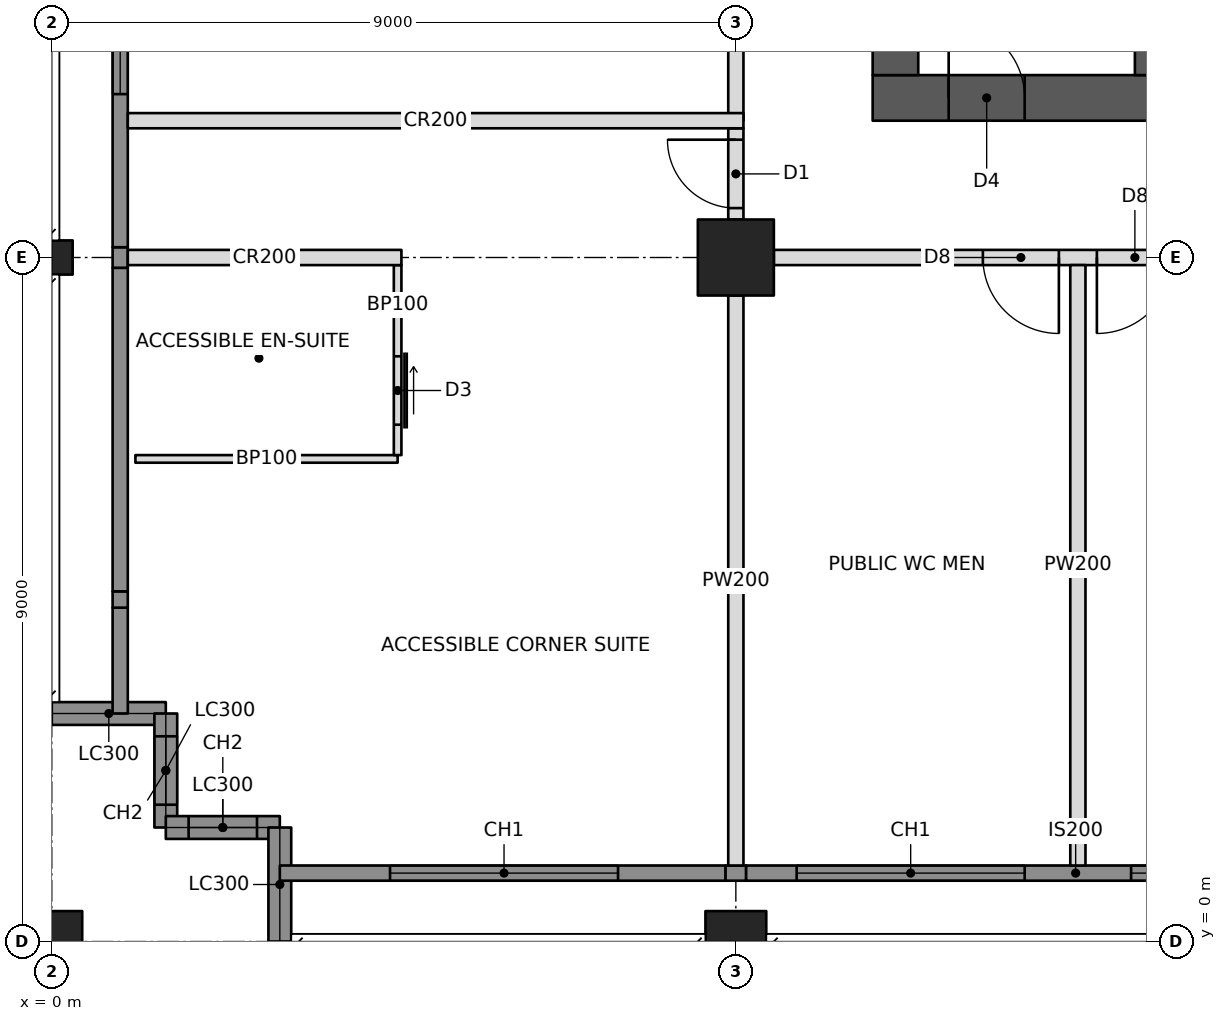
"""IFC4 building model, lengths in metres.
Left out: names, types, materials, properties, quantities, classifications, styles, units other than length and angle.
Written with IfcOpenShell. Run it as: python <this file> out.ifc"""

import sys

from ifc_helpers import new_model, si_unit, direction, frame, frame_2d, origin, origin_with_axes, origin_2d, place, context, subcontext, project, spatial, rectangle, hollow_rectangle, i_section, extrude, element, fill, save


model = new_model("IFC4")
c1 = context("Model", 3, precision=1e-05, world=origin(), true_north=direction((0.0, 1.0)))
c2 = subcontext(c1, "Body", "Model", "MODEL_VIEW")
j1 = project(units=[si_unit("LENGTHUNIT", "METRE"), si_unit("PLANEANGLEUNIT", "RADIAN")], contexts=[c1])
p1 = place(None, origin())
s1 = spatial("IfcSite", under=j1, at=p1, CompositionType="ELEMENT")
p2 = place(p1, origin())
s2 = spatial("IfcBuilding", under=s1, at=p2, CompositionType="ELEMENT")
p3 = place(p2, frame((0.0, 0.0, 160.4)))
s3 = spatial("IfcBuildingStorey", under=s2, at=p3, CompositionType="ELEMENT", Elevation=160.4)
p4 = place(p3, origin_with_axes())
e1 = element("IfcColumn", 1, at=p4, inside=s3, PredefinedType="COLUMN", context=c2, shape_type="SweptSolid", body=[
    extrude(hollow_rectangle(XDim=0.8, YDim=0.8, WallThickness=0.07, at=origin_2d()), origin(), (0.0, 0.0, 1.0), 3.4),
])
p5 = place(p3, frame((0.0, 9.0, 0.0), z_axis=(0.0, 0.0, 1.0), x_axis=(0.0, 1.0, 0.0)))
e2 = element("IfcColumn", 2, at=p5, inside=s3, PredefinedType="COLUMN", context=c2, shape_type="SweptSolid", body=[
    extrude(i_section(OverallWidth=0.449, OverallDepth=0.549, WebThickness=0.072, FlangeThickness=0.115, at=origin_2d()), origin(), (0.0, 0.0, 1.0), 3.4),
])
p6 = place(p3, frame((9.0, 0.0, 0.0), z_axis=(0.0, 0.0, 1.0), x_axis=(1.0, 0.0, 0.0)))
e3 = element("IfcColumn", 3, at=p6, inside=s3, PredefinedType="COLUMN", context=c2, shape_type="SweptSolid", body=[
    extrude(hollow_rectangle(XDim=0.8, YDim=0.8, WallThickness=0.07, at=origin_2d()), origin(), (0.0, 0.0, 1.0), 3.4),
])
p7 = place(p3, frame((9.0, 9.0, 0.0), z_axis=(0.0, 0.0, 1.0), x_axis=(1.0, 0.0, 0.0)))
e4 = element("IfcColumn", 4, at=p7, inside=s3, PredefinedType="COLUMN", context=c2, shape_type="SweptSolid", body=[
    extrude(hollow_rectangle(XDim=1.0, YDim=1.0, WallThickness=0.1, at=origin_2d()), origin(), (0.0, 0.0, 1.0), 3.4),
])
p8 = place(p3, frame((10.8, 11.1, 0.0), z_axis=(0.0, 0.0, 1.0), x_axis=(1.0, 0.0, 0.0)))
e5 = element("IfcWall", 5, at=p8, inside=s3, PredefinedType="SHEAR", context=c2, shape_type="SweptSolid", body=[
    extrude(rectangle(XDim=23.4, YDim=0.6, at=frame_2d((11.7, 0.0))), origin(), (0.0, 0.0, 1.0), 3.4),
])
p9 = place(p8, frame((1.0, 0.0, 0.0)))
e6 = element("IfcOpeningElement", 6, at=p9, cuts=e5, PredefinedType="OPENING", context=c2, shape_type="SweptSolid", body=[
    extrude(rectangle(XDim=1.0, YDim=2.1, at=frame_2d((0.5, 1.05))), frame((0.0, 0.31, 0.0), z_axis=(0.0, -1.0, 0.0), x_axis=(1.0, 0.0, 0.0)), (0.0, 0.0, 1.0), 0.62),
])
p10 = place(p8, frame((17.2, 0.0, 0.0)))
e7 = element("IfcOpeningElement", 7, at=p10, cuts=e5, PredefinedType="OPENING", context=c2, shape_type="SweptSolid", body=[
    extrude(rectangle(XDim=1.8, YDim=2.1, at=frame_2d((0.9, 1.05))), frame((0.0, 0.31, 0.0), z_axis=(0.0, -1.0, 0.0), x_axis=(1.0, 0.0, 0.0)), (0.0, 0.0, 1.0), 0.62),
])
p11 = place(p3, frame((11.1, 11.4, 0.0), z_axis=(0.0, 0.0, 1.0), x_axis=(0.0, 1.0, 0.0)))
e8 = element("IfcWall", 8, at=p11, inside=s3, PredefinedType="SHEAR", context=c2, shape_type="SweptSolid", body=[
    extrude(rectangle(XDim=13.2, YDim=0.6, at=frame_2d((6.6, 0.0))), origin(), (0.0, 0.0, 1.0), 3.4),
])
p12 = place(p3, frame((14.4, 11.4, 0.0), z_axis=(0.0, 0.0, 1.0), x_axis=(0.0, 1.0, 0.0)))
e9 = element("IfcWall", 9, at=p12, inside=s3, PredefinedType="SHEAR", context=c2, shape_type="SweptSolid", body=[
    extrude(rectangle(XDim=13.2, YDim=0.3, at=frame_2d((6.6, 0.0))), origin(), (0.0, 0.0, 1.0), 3.4),
])
p13 = place(p3, frame((0.0, 3.0, 0.0), z_axis=(0.0, 0.0, 1.0), x_axis=(1.0, 0.0, 0.0)))
e10 = element("IfcWall", 10, at=p13, inside=s3, PredefinedType="SOLIDWALL", context=c2, shape_type="SweptSolid", body=[
    extrude(rectangle(XDim=1.5, YDim=0.3, at=frame_2d((0.75, 0.0))), origin(), (0.0, 0.0, 1.0), 2.42),
])
p14 = place(p3, frame((1.5, 3.0, 0.0), z_axis=(0.0, 0.0, 1.0), x_axis=(0.0, -1.0, 0.0)))
e11 = element("IfcWall", 11, at=p14, inside=s3, PredefinedType="SOLIDWALL", context=c2, shape_type="SweptSolid", body=[
    extrude(rectangle(XDim=1.5, YDim=0.3, at=frame_2d((0.75, 0.0))), origin(), (0.0, 0.0, 1.0), 3.2),
])
p15 = place(p14, frame((0.3, 0.0, 0.6)))
e12 = element("IfcOpeningElement", 12, at=p15, cuts=e11, PredefinedType="OPENING", context=c2, shape_type="SweptSolid", body=[
    extrude(rectangle(XDim=0.9, YDim=2.2, at=frame_2d((0.45, 1.1))), frame((0.0, 0.16, 0.0), z_axis=(0.0, -1.0, 0.0), x_axis=(1.0, 0.0, 0.0)), (0.0, 0.0, 1.0), 0.32),
])
p16 = place(p3, frame((1.5, 1.5, 0.0), z_axis=(0.0, 0.0, 1.0), x_axis=(1.0, 0.0, 0.0)))
e13 = element("IfcWall", 13, at=p16, inside=s3, PredefinedType="SOLIDWALL", context=c2, shape_type="SweptSolid", body=[
    extrude(rectangle(XDim=1.5, YDim=0.3, at=frame_2d((0.75, 0.0))), origin(), (0.0, 0.0, 1.0), 3.2),
])
p17 = place(p16, frame((0.3, 0.0, 0.6)))
e14 = element("IfcOpeningElement", 14, at=p17, cuts=e13, PredefinedType="OPENING", context=c2, shape_type="SweptSolid", body=[
    extrude(rectangle(XDim=0.9, YDim=2.2, at=frame_2d((0.45, 1.1))), frame((0.0, 0.16, 0.0), z_axis=(0.0, -1.0, 0.0), x_axis=(1.0, 0.0, 0.0)), (0.0, 0.0, 1.0), 0.32),
])
p18 = place(p3, frame((3.0, 1.5, 0.0), z_axis=(0.0, 0.0, 1.0), x_axis=(0.0, -1.0, 0.0)))
e15 = element("IfcWall", 15, at=p18, inside=s3, PredefinedType="SOLIDWALL", context=c2, shape_type="SweptSolid", body=[
    extrude(rectangle(XDim=1.5, YDim=0.3, at=frame_2d((0.75, 0.0))), origin(), (0.0, 0.0, 1.0), 2.42),
])
p19 = place(p3, frame((3.0, 0.9, 0.0), z_axis=(0.0, 0.0, 1.0), x_axis=(1.0, 0.0, 0.0)))
e16 = element("IfcWall", 16, at=p19, inside=s3, PredefinedType="SOLIDWALL", context=c2, shape_type="SweptSolid", body=[
    extrude(rectangle(XDim=5.865, YDim=0.2, at=frame_2d((2.932, 0.0))), origin(), (0.0, 0.0, 1.0), 3.2),
])
p20 = place(p19, frame((1.45, 0.0, 0.6)))
e17 = element("IfcOpeningElement", 17, at=p20, cuts=e16, PredefinedType="OPENING", context=c2, shape_type="SweptSolid", body=[
    extrude(rectangle(XDim=3.0, YDim=2.2, at=frame_2d((1.5, 1.1))), frame((0.0, 0.11, 0.0), z_axis=(0.0, -1.0, 0.0), x_axis=(1.0, 0.0, 0.0)), (0.0, 0.0, 1.0), 0.22),
])
p21 = place(p3, frame((0.9, 3.0, 0.0), z_axis=(0.0, 0.0, 1.0), x_axis=(0.0, 1.0, 0.0)))
e18 = element("IfcWall", 18, at=p21, inside=s3, PredefinedType="SOLIDWALL", context=c2, shape_type="SweptSolid", body=[
    extrude(rectangle(XDim=1.393, YDim=0.2, at=frame_2d((0.696, 0.0))), origin(), (0.0, 0.0, 1.0), 3.2),
])
p22 = place(p3, frame((1.0, 9.0, 0.0), z_axis=(0.0, 0.0, 1.0), x_axis=(1.0, 0.0, 0.0)))
e19 = element("IfcWall", 19, at=p22, inside=s3, PredefinedType="PARTITIONING", context=c2, shape_type="SweptSolid", body=[
    extrude(rectangle(XDim=3.6, YDim=0.2, at=frame_2d((1.8, 0.0))), origin(), (0.0, 0.0, 1.0), 2.438),
])
p23 = place(p3, frame((9.5, 9.0, 0.0), z_axis=(0.0, 0.0, 1.0), x_axis=(1.0, 0.0, 0.0)))
e20 = element("IfcWall", 20, at=p23, inside=s3, PredefinedType="PARTITIONING", context=c2, shape_type="SweptSolid", body=[
    extrude(rectangle(XDim=8.0, YDim=0.2, at=frame_2d((4.0, 0.0))), origin(), (0.0, 0.0, 1.0), 2.405),
])
p24 = place(p23, frame((2.75, 0.0, 0.0)))
e21 = element("IfcOpeningElement", 21, at=p24, cuts=e20, PredefinedType="OPENING", context=c2, shape_type="SweptSolid", body=[
    extrude(rectangle(XDim=1.0, YDim=2.1, at=frame_2d((0.5, 1.05))), frame((0.0, 0.11, 0.0), z_axis=(0.0, -1.0, 0.0), x_axis=(1.0, 0.0, 0.0)), (0.0, 0.0, 1.0), 0.22),
])
p25 = place(p23, frame((6.8, 0.0, 0.0)))
e22 = element("IfcOpeningElement", 22, at=p25, cuts=e20, PredefinedType="OPENING", context=c2, shape_type="SweptSolid", body=[
    extrude(rectangle(XDim=1.0, YDim=2.1, at=frame_2d((0.5, 1.05))), frame((0.0, 0.11, 0.0), z_axis=(0.0, -1.0, 0.0), x_axis=(1.0, 0.0, 0.0)), (0.0, 0.0, 1.0), 0.22),
])
p26 = place(p23, frame((4.25, 0.0, 0.0)))
e23 = element("IfcOpeningElement", 23, at=p26, cuts=e20, PredefinedType="OPENING", context=c2, shape_type="SweptSolid", body=[
    extrude(rectangle(XDim=1.0, YDim=2.1, at=frame_2d((0.5, 1.05))), frame((0.0, 0.11, 0.0), z_axis=(0.0, -1.0, 0.0), x_axis=(1.0, 0.0, 0.0)), (0.0, 0.0, 1.0), 0.22),
])
p27 = place(p3, frame((9.0, 10.8, 0.0), z_axis=(0.0, 0.0, 1.0), x_axis=(0.0, 1.0, 0.0)))
e24 = element("IfcWall", 24, at=p27, inside=s3, PredefinedType="PARTITIONING", context=c2, shape_type="SweptSolid", body=[
    extrude(rectangle(XDim=6.7, YDim=0.2, at=frame_2d((3.35, 0.0))), origin(), (0.0, 0.0, 1.0), 2.405),
])
p28 = place(p27, frame((3.6, 0.0, 0.0)))
e25 = element("IfcOpeningElement", 25, at=p28, cuts=e24, PredefinedType="OPENING", context=c2, shape_type="SweptSolid", body=[
    extrude(rectangle(XDim=1.8, YDim=2.4, at=frame_2d((0.9, 1.2))), frame((0.0, 0.11, 0.0), z_axis=(0.0, -1.0, 0.0), x_axis=(1.0, 0.0, 0.0)), (0.0, 0.0, 1.0), 0.22),
])
p29 = place(p3, frame((1.0, 10.8, 0.0), z_axis=(0.0, 0.0, 1.0), x_axis=(1.0, 0.0, 0.0)))
e26 = element("IfcWall", 26, at=p29, inside=s3, PredefinedType="PARTITIONING", context=c2, shape_type="SweptSolid", body=[
    extrude(rectangle(XDim=8.1, YDim=0.2, at=frame_2d((4.05, 0.0))), origin(), (0.0, 0.0, 1.0), 2.404),
])
p30 = place(p3, frame((9.0, 8.5, 0.0), z_axis=(0.0, 0.0, 1.0), x_axis=(0.0, -1.0, 0.0)))
e27 = element("IfcWall", 27, at=p30, inside=s3, PredefinedType="PARTITIONING", context=c2, shape_type="SweptSolid", body=[
    extrude(rectangle(XDim=7.5, YDim=0.2, at=frame_2d((3.75, 0.0))), origin(), (0.0, 0.0, 1.0), 2.438),
])
p31 = place(p3, frame((1.1, 6.35, 0.0), z_axis=(0.0, 0.0, 1.0), x_axis=(1.0, 0.0, 0.0)))
e28 = element("IfcWall", 28, at=p31, inside=s3, PredefinedType="PARTITIONING", context=c2, shape_type="SweptSolid", body=[
    extrude(rectangle(XDim=3.45, YDim=0.1, at=frame_2d((1.725, 0.0))), origin(), (0.0, 0.0, 1.0), 3.2),
])
p32 = place(p3, frame((4.55, 8.9, 0.0), z_axis=(0.0, 0.0, 1.0), x_axis=(0.0, -1.0, 0.0)))
e29 = element("IfcWall", 29, at=p32, inside=s3, PredefinedType="PARTITIONING", context=c2, shape_type="SweptSolid", body=[
    extrude(rectangle(XDim=2.5, YDim=0.1, at=frame_2d((1.25, 0.0))), origin(), (0.0, 0.0, 1.0), 2.438),
])
p33 = place(p32, frame((1.2, 0.0, 0.0)))
e30 = element("IfcOpeningElement", 30, at=p33, cuts=e29, PredefinedType="OPENING", context=c2, shape_type="SweptSolid", body=[
    extrude(rectangle(XDim=0.9, YDim=2.1, at=frame_2d((0.45, 1.05))), frame((0.0, 0.06, 0.0), z_axis=(0.0, -1.0, 0.0), x_axis=(1.0, 0.0, 0.0)), (0.0, 0.0, 1.0), 0.12),
])
p34 = place(p3, frame((13.5, 8.9, 0.0), z_axis=(0.0, 0.0, 1.0), x_axis=(0.0, -1.0, 0.0)))
e31 = element("IfcWall", 31, at=p34, inside=s3, PredefinedType="PARTITIONING", context=c2, shape_type="SweptSolid", body=[
    extrude(rectangle(XDim=7.9, YDim=0.2, at=frame_2d((3.95, 0.0))), origin(), (0.0, 0.0, 1.0), 2.404),
])
p35 = place(p3, frame((9.0, 9.5, 0.0), z_axis=(0.0, 0.0, 1.0), x_axis=(0.0, 1.0, 0.0)))
e32 = element("IfcWall", 32, at=p35, inside=s3, PredefinedType="PARTITIONING", context=c2, shape_type="SweptSolid", body=[
    extrude(rectangle(XDim=1.2, YDim=0.2, at=frame_2d((0.6, 0.0))), origin(), (0.0, 0.0, 1.0), 2.405),
])
p36 = place(p35, frame((0.15, 0.0, 0.0)))
e33 = element("IfcOpeningElement", 33, at=p36, cuts=e32, PredefinedType="OPENING", context=c2, shape_type="SweptSolid", body=[
    extrude(rectangle(XDim=0.9, YDim=2.1, at=frame_2d((0.45, 1.05))), frame((0.0, 0.11, 0.0), z_axis=(0.0, -1.0, 0.0), x_axis=(1.0, 0.0, 0.0)), (0.0, 0.0, 1.0), 0.22),
])
p37 = place(p3, frame((8.865, 0.9, 0.0), z_axis=(0.0, 0.0, 1.0), x_axis=(1.0, 0.0, 0.0)))
e34 = element("IfcWall", 34, at=p37, inside=s3, PredefinedType="SOLIDWALL", context=c2, shape_type="SweptSolid", body=[
    extrude(rectangle(XDim=0.271, YDim=0.2, at=frame_2d((0.135, 0.0))), origin(), (0.0, 0.0, 1.0), 2.438),
])
p38 = place(p3, frame((9.135, 0.9, 0.0), z_axis=(0.0, 0.0, 1.0), x_axis=(1.0, 0.0, 0.0)))
e35 = element("IfcWall", 35, at=p38, inside=s3, PredefinedType="SOLIDWALL", context=c2, shape_type="SweptSolid", body=[
    extrude(rectangle(XDim=8.671, YDim=0.2, at=frame_2d((4.335, 0.0))), origin(), (0.0, 0.0, 1.0), 3.2),
])
p39 = place(p38, frame((0.665, 0.0, 0.6)))
e36 = element("IfcOpeningElement", 36, at=p39, cuts=e35, PredefinedType="OPENING", context=c2, shape_type="SweptSolid", body=[
    extrude(rectangle(XDim=3.0, YDim=2.2, at=frame_2d((1.5, 1.1))), frame((0.0, 0.11, 0.0), z_axis=(0.0, -1.0, 0.0), x_axis=(1.0, 0.0, 0.0)), (0.0, 0.0, 1.0), 0.22),
])
p40 = place(p38, frame((5.065, 0.0, 0.6)))
e37 = element("IfcOpeningElement", 37, at=p40, cuts=e35, PredefinedType="OPENING", context=c2, shape_type="SweptSolid", body=[
    extrude(rectangle(XDim=3.0, YDim=2.2, at=frame_2d((1.5, 1.1))), frame((0.0, 0.11, 0.0), z_axis=(0.0, -1.0, 0.0), x_axis=(1.0, 0.0, 0.0)), (0.0, 0.0, 1.0), 0.22),
])
p41 = place(p3, frame((0.9, 4.393, 0.0), z_axis=(0.0, 0.0, 1.0), x_axis=(0.0, 1.0, 0.0)))
e38 = element("IfcWall", 38, at=p41, inside=s3, PredefinedType="SOLIDWALL", context=c2, shape_type="SweptSolid", body=[
    extrude(rectangle(XDim=0.215, YDim=0.2, at=frame_2d((0.107, 0.0))), origin(), (0.0, 0.0, 1.0), 2.661),
])
p42 = place(p3, frame((0.9, 4.607, 0.0), z_axis=(0.0, 0.0, 1.0), x_axis=(0.0, 1.0, 0.0)))
e39 = element("IfcWall", 39, at=p42, inside=s3, PredefinedType="SOLIDWALL", context=c2, shape_type="SweptSolid", body=[
    extrude(rectangle(XDim=4.257, YDim=0.2, at=frame_2d((2.129, 0.0))), origin(), (0.0, 0.0, 1.0), 3.2),
])
p43 = place(p3, frame((0.9, 8.865, 0.0), z_axis=(0.0, 0.0, 1.0), x_axis=(0.0, 1.0, 0.0)))
e40 = element("IfcWall", 40, at=p43, inside=s3, PredefinedType="SOLIDWALL", context=c2, shape_type="SweptSolid", body=[
    extrude(rectangle(XDim=0.271, YDim=0.2, at=frame_2d((0.135, 0.0))), origin(), (0.0, 0.0, 1.0), 2.438),
])
p44 = place(p3, frame((0.9, 9.135, 0.0), z_axis=(0.0, 0.0, 1.0), x_axis=(0.0, 1.0, 0.0)))
e41 = element("IfcWall", 41, at=p44, inside=s3, PredefinedType="SOLIDWALL", context=c2, shape_type="SweptSolid", body=[
    extrude(rectangle(XDim=8.671, YDim=0.2, at=frame_2d((4.335, 0.0))), origin(), (0.0, 0.0, 1.0), 3.2),
])
p45 = place(p44, frame((2.015, 0.0, 0.6)))
e42 = element("IfcOpeningElement", 42, at=p45, cuts=e41, PredefinedType="OPENING", context=c2, shape_type="SweptSolid", body=[
    extrude(rectangle(XDim=3.0, YDim=2.2, at=frame_2d((1.5, 1.1))), frame((0.0, 0.11, 0.0), z_axis=(0.0, -1.0, 0.0), x_axis=(1.0, 0.0, 0.0)), (0.0, 0.0, 1.0), 0.22),
])
p46 = place(p44, frame((5.515, 0.0, 0.6)))
e43 = element("IfcOpeningElement", 43, at=p46, cuts=e41, PredefinedType="OPENING", context=c2, shape_type="SweptSolid", body=[
    extrude(rectangle(XDim=3.0, YDim=2.2, at=frame_2d((1.5, 1.1))), frame((0.0, 0.11, 0.0), z_axis=(0.0, -1.0, 0.0), x_axis=(1.0, 0.0, 0.0)), (0.0, 0.0, 1.0), 0.22),
])
p47 = place(p15, origin())
e44 = element("IfcWindow", 44, at=p47, inside=s3, PartitioningType="SINGLE_PANEL", PredefinedType="WINDOW", context=c2, shape_type="SweptSolid", body=[
    extrude(rectangle(XDim=0.9, YDim=2.2, at=frame_2d((0.45, 1.1))), frame((0.0, 0.03, 0.0), z_axis=(0.0, -1.0, 0.0), x_axis=(1.0, 0.0, 0.0)), (0.0, 0.0, 1.0), 0.06),
])
fill(e12, e44)
p48 = place(p17, origin())
e45 = element("IfcWindow", 45, at=p48, inside=s3, PartitioningType="SINGLE_PANEL", PredefinedType="WINDOW", context=c2, shape_type="SweptSolid", body=[
    extrude(rectangle(XDim=0.9, YDim=2.2, at=frame_2d((0.45, 1.1))), frame((0.0, 0.03, 0.0), z_axis=(0.0, -1.0, 0.0), x_axis=(1.0, 0.0, 0.0)), (0.0, 0.0, 1.0), 0.06),
])
fill(e14, e45)
p49 = place(p20, origin())
e46 = element("IfcWindow", 46, at=p49, inside=s3, PartitioningType="TRIPLE_PANEL_VERTICAL", PredefinedType="WINDOW", context=c2, shape_type="SweptSolid", body=[
    extrude(rectangle(XDim=3.0, YDim=2.2, at=frame_2d((1.5, 1.1))), frame((0.0, 0.03, 0.0), z_axis=(0.0, -1.0, 0.0), x_axis=(1.0, 0.0, 0.0)), (0.0, 0.0, 1.0), 0.06),
])
fill(e17, e46)
p50 = place(p39, origin())
e47 = element("IfcWindow", 47, at=p50, inside=s3, PartitioningType="TRIPLE_PANEL_VERTICAL", PredefinedType="WINDOW", context=c2, shape_type="SweptSolid", body=[
    extrude(rectangle(XDim=3.0, YDim=2.2, at=frame_2d((1.5, 1.1))), frame((0.0, 0.03, 0.0), z_axis=(0.0, -1.0, 0.0), x_axis=(1.0, 0.0, 0.0)), (0.0, 0.0, 1.0), 0.06),
])
fill(e36, e47)
p51 = place(p40, origin())
e48 = element("IfcWindow", 48, at=p51, inside=s3, PartitioningType="TRIPLE_PANEL_VERTICAL", PredefinedType="WINDOW", context=c2, shape_type="SweptSolid", body=[
    extrude(rectangle(XDim=3.0, YDim=2.2, at=frame_2d((1.5, 1.1))), frame((0.0, 0.03, 0.0), z_axis=(0.0, -1.0, 0.0), x_axis=(1.0, 0.0, 0.0)), (0.0, 0.0, 1.0), 0.06),
])
fill(e37, e48)
p52 = place(p45, origin())
e49 = element("IfcWindow", 49, at=p52, inside=s3, PartitioningType="TRIPLE_PANEL_VERTICAL", PredefinedType="WINDOW", context=c2, shape_type="SweptSolid", body=[
    extrude(rectangle(XDim=3.0, YDim=2.2, at=frame_2d((1.5, 1.1))), frame((0.0, 0.03, 0.0), z_axis=(0.0, -1.0, 0.0), x_axis=(1.0, 0.0, 0.0)), (0.0, 0.0, 1.0), 0.06),
])
fill(e42, e49)
p53 = place(p33, origin())
e50 = element("IfcDoor", 50, at=p53, inside=s3, OperationType="SLIDING_TO_LEFT", PredefinedType="DOOR", context=c2, shape_type="SweptSolid", body=[
    extrude(rectangle(XDim=0.9, YDim=2.1, at=frame_2d((0.45, 1.05))), frame((0.0, 0.025, 0.0), z_axis=(0.0, -1.0, 0.0), x_axis=(1.0, 0.0, 0.0)), (0.0, 0.0, 1.0), 0.05),
])
fill(e30, e50)
p54 = place(p24, frame((1.0, 0.0, 0.0), z_axis=(0.0, 0.0, 1.0), x_axis=(-1.0, 0.0, 0.0)))
e51 = element("IfcDoor", 51, at=p54, inside=s3, OperationType="SINGLE_SWING_LEFT", PredefinedType="DOOR", context=c2, shape_type="SweptSolid", body=[
    extrude(rectangle(XDim=1.0, YDim=2.1, at=frame_2d((0.5, 1.05))), frame((0.0, 0.025, 0.0), z_axis=(0.0, -1.0, 0.0), x_axis=(1.0, 0.0, 0.0)), (0.0, 0.0, 1.0), 0.05),
])
fill(e21, e51)
p55 = place(p26, frame((1.0, 0.0, 0.0), z_axis=(0.0, 0.0, 1.0), x_axis=(-1.0, 0.0, 0.0)))
e52 = element("IfcDoor", 52, at=p55, inside=s3, OperationType="SINGLE_SWING_RIGHT", PredefinedType="DOOR", context=c2, shape_type="SweptSolid", body=[
    extrude(rectangle(XDim=1.0, YDim=2.1, at=frame_2d((0.5, 1.05))), frame((0.0, 0.025, 0.0), z_axis=(0.0, -1.0, 0.0), x_axis=(1.0, 0.0, 0.0)), (0.0, 0.0, 1.0), 0.05),
])
fill(e23, e52)
p56 = place(p36, origin())
e53 = element("IfcDoor", 53, at=p56, inside=s3, OperationType="SINGLE_SWING_RIGHT", PredefinedType="DOOR", context=c2, shape_type="SweptSolid", body=[
    extrude(rectangle(XDim=0.9, YDim=2.1, at=frame_2d((0.45, 1.05))), frame((0.0, 0.025, 0.0), z_axis=(0.0, -1.0, 0.0), x_axis=(1.0, 0.0, 0.0)), (0.0, 0.0, 1.0), 0.05),
])
fill(e33, e53)
p57 = place(p9, origin())
e54 = element("IfcDoor", 54, at=p57, inside=s3, OperationType="SINGLE_SWING_LEFT", PredefinedType="DOOR", context=c2, shape_type="SweptSolid", body=[
    extrude(rectangle(XDim=1.0, YDim=2.1, at=frame_2d((0.5, 1.05))), frame((0.0, 0.025, 0.0), z_axis=(0.0, -1.0, 0.0), x_axis=(1.0, 0.0, 0.0)), (0.0, 0.0, 1.0), 0.05),
])
fill(e6, e54)
save(model, sys.argv[1])
